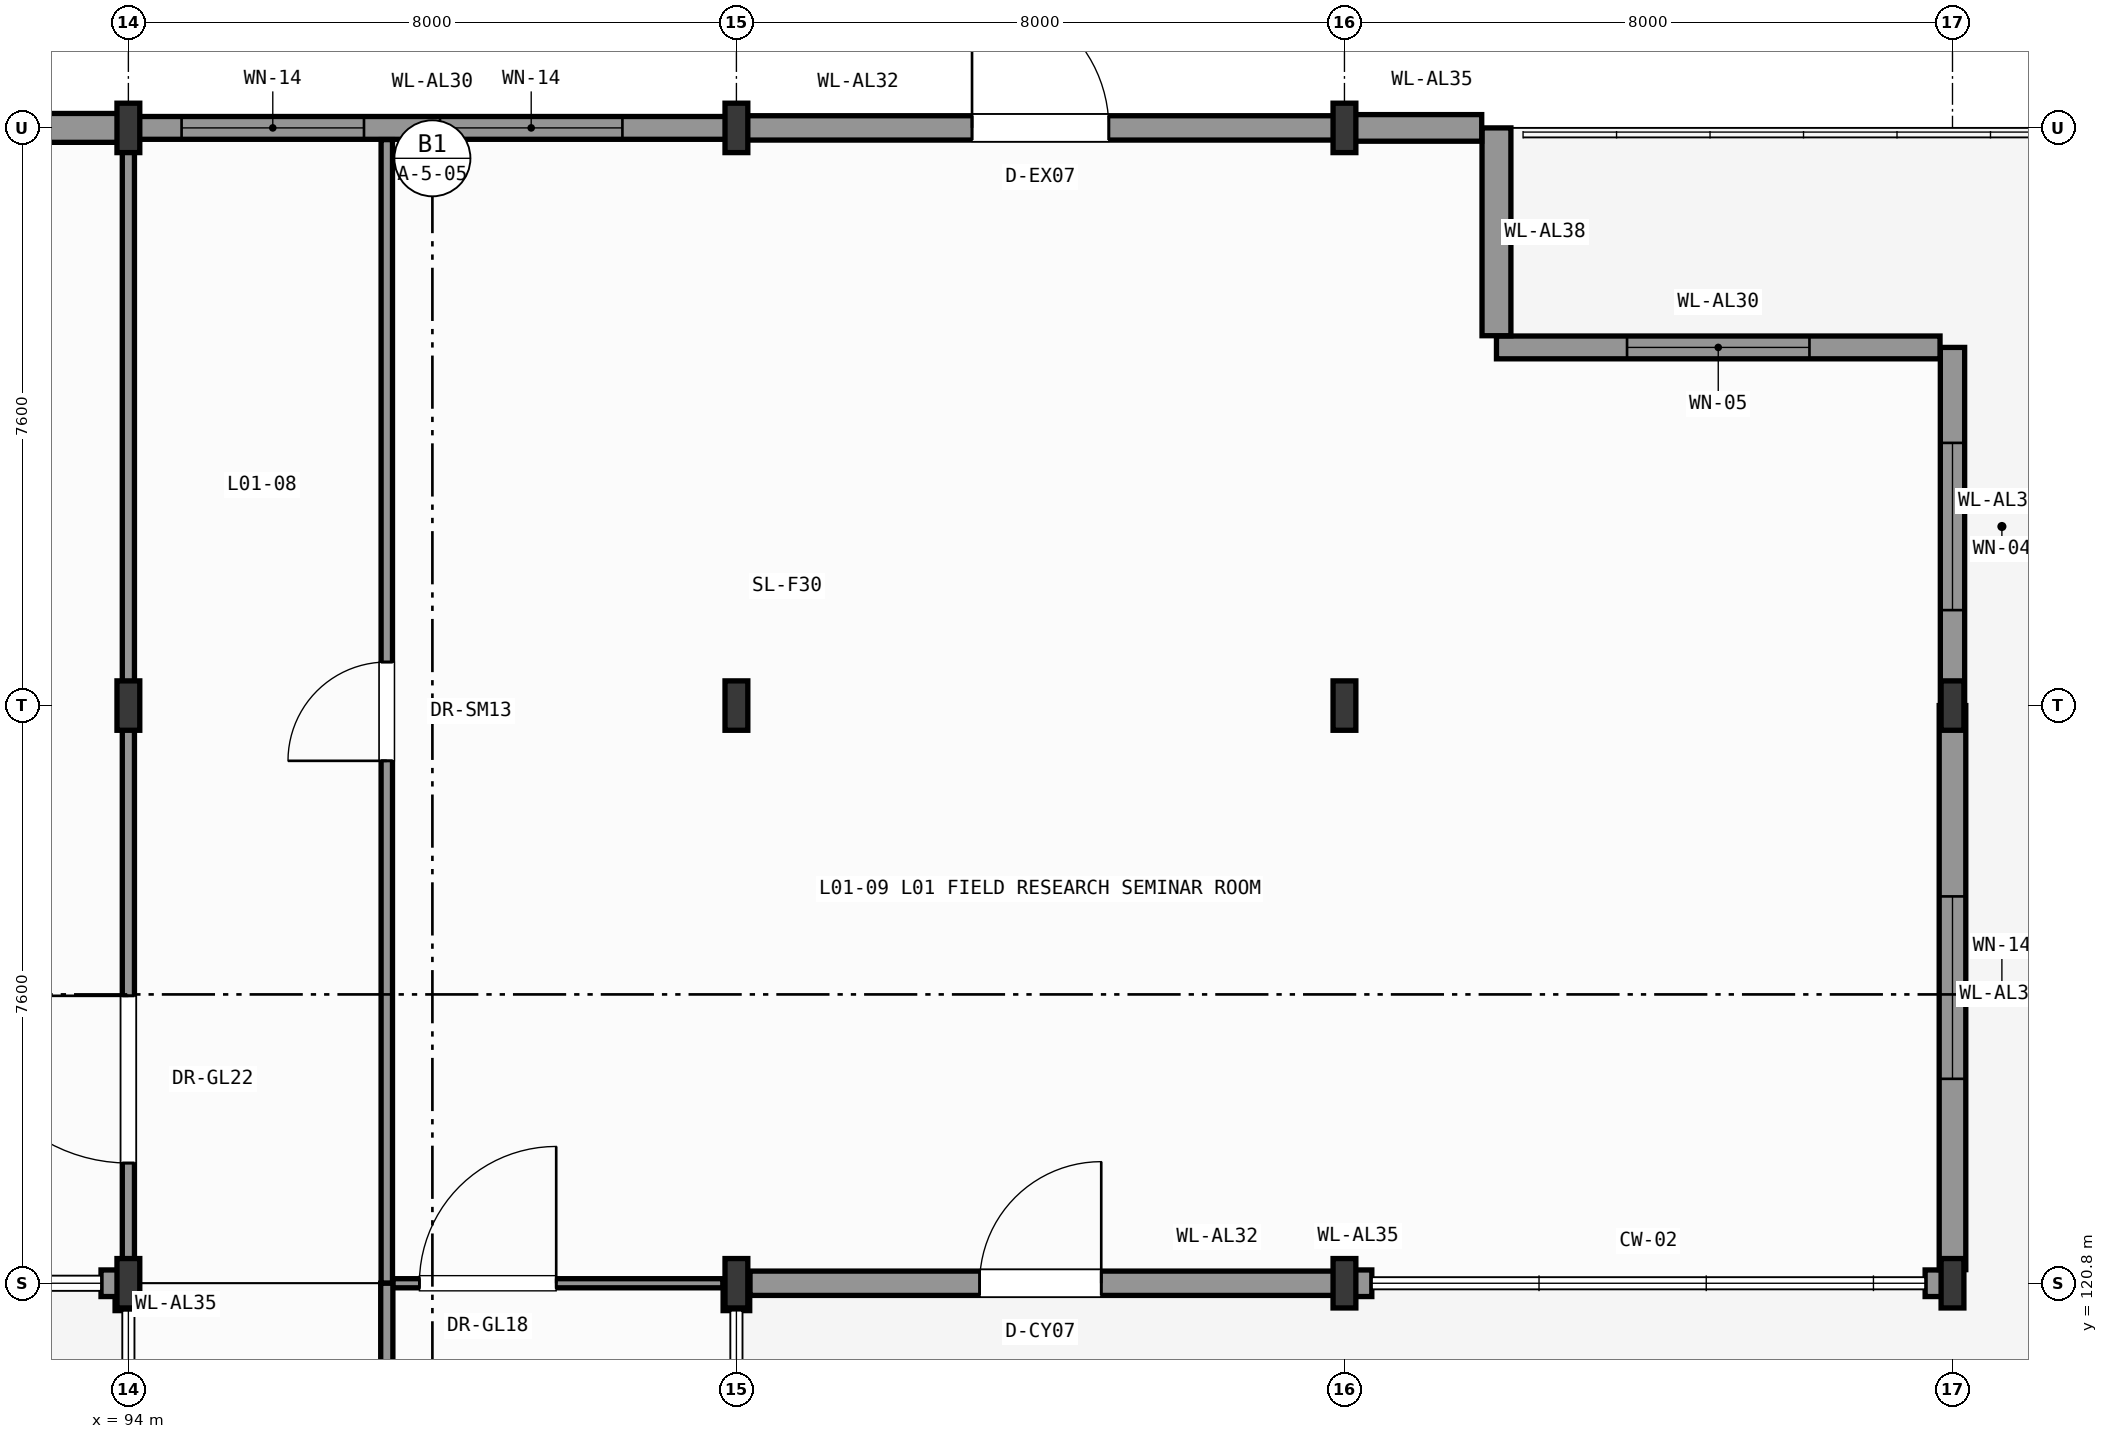
"""IFC4 building model, lengths in metres.
Left out: names, types, materials, properties, quantities, classifications, styles, units other than length and angle.
Written with IfcOpenShell. Run it as: python <this file> out.ifc"""

import sys

from ifc_helpers import new_model, si_unit, direction, frame, frame_2d, origin, origin_2d, place, context, subcontext, project, spatial, rectangle, i_section, extrude, element, fill, save


model = new_model("IFC4")
c1 = context("Model", 3, precision=1e-05, world=origin(), true_north=direction((0.0, 1.0)))
c2 = subcontext(c1, "Body", "Model", "MODEL_VIEW")
j1 = project(units=[si_unit("LENGTHUNIT", "METRE"), si_unit("PLANEANGLEUNIT", "RADIAN")], contexts=[c1])
p1 = place(None, origin())
s1 = spatial("IfcSite", under=j1, at=p1, CompositionType="ELEMENT")
p2 = place(p1, origin())
s2 = spatial("IfcBuilding", under=s1, at=p2, CompositionType="ELEMENT")
p3 = place(p2, origin())
s3 = spatial("IfcBuildingStorey", under=s2, at=p3, CompositionType="ELEMENT", Elevation=0.0)
for number, where, z_axis, x_axis in (
    (1, (94.0, 120.8, 0.0), (0.0, 0.0, 1.0), (1.0, 0.0, 0.0)),
    (2, (94.0, 128.4, 0.0), (0.0, 0.0, 1.0), (1.0, 0.0, 0.0)),
    (3, (94.0, 136.0, 0.0), (0.0, 0.0, 1.0), (1.0, 0.0, 0.0)),
    (4, (102.0, 120.8, 0.0), (0.0, 0.0, 1.0), (1.0, 0.0, 0.0)),
    (5, (102.0, 128.4, 0.0), (0.0, 0.0, 1.0), (1.0, 0.0, 0.0)),
    (6, (102.0, 136.0, 0.0), (0.0, 0.0, 1.0), (1.0, 0.0, 0.0)),
    (7, (110.0, 120.8, 0.0), (0.0, 0.0, 1.0), (1.0, 0.0, 0.0)),
    (8, (110.0, 128.4, 0.0), (0.0, 0.0, 1.0), (1.0, 0.0, 0.0)),
    (9, (110.0, 136.0, 0.0), (0.0, 0.0, 1.0), (1.0, 0.0, 0.0)),
    (10, (118.0, 120.8, 0.0), (0.0, 0.0, 1.0), (1.0, 0.0, 0.0)),
    (11, (118.0, 128.4, 0.0), (0.0, 0.0, 1.0), (1.0, 0.0, 0.0)),
):
    element("IfcColumn", number, at=place(p3, frame(where, z_axis=z_axis, x_axis=x_axis)), inside=s3, PredefinedType="COLUMN", context=c2, shape_type="SweptSolid", body=[
        extrude(i_section(OverallWidth=0.3, OverallDepth=0.65, WebThickness=0.016, FlangeThickness=0.031, FilletRadius=0.027, at=origin_2d()), origin(), (0.0, 0.0, 1.0), 7.8),
    ])
p4 = place(p3, frame((102.0, 120.44, 0.0), z_axis=(0.0, 0.0, 1.0), x_axis=(0.0, 1.0, 0.0)))
e12 = element("IfcWall", 12, at=p4, inside=s3, PredefinedType="SOLIDWALL", context=c2, shape_type="SweptSolid", body=[
    extrude(rectangle(XDim=0.36, YDim=0.35, at=frame_2d((0.18, 0.0))), origin(), (0.0, 0.0, 1.0), 7.025),
])
p5 = place(p3, frame((110.0, 120.8, 0.0), z_axis=(0.0, 0.0, 1.0), x_axis=(-1.0, 0.0, 0.0)))
e13 = element("IfcWall", 13, at=p5, inside=s3, PredefinedType="SOLIDWALL", context=c2, shape_type="SweptSolid", body=[
    extrude(rectangle(XDim=7.821, YDim=0.32, at=frame_2d((3.911, 0.0))), origin(), (0.0, 0.0, 1.0), 7.075),
])
p6 = place(p5, frame((3.2, 0.0, 0.0)))
e14 = element("IfcOpeningElement", 14, at=p6, cuts=e13, PredefinedType="OPENING", context=c2, shape_type="SweptSolid", body=[
    extrude(rectangle(XDim=1.6, YDim=2.4, at=frame_2d((0.8, 1.2))), frame((0.0, 0.17, 0.0), z_axis=(0.0, -1.0, 0.0), x_axis=(1.0, 0.0, 0.0)), (0.0, 0.0, 1.0), 0.34),
])
for number, where, z_axis, x_axis in (
    (15, (110.0, 120.8, 0.0), (0.0, 0.0, 1.0), (1.0, 0.0, 0.0)),
    (16, (117.64, 120.8, 0.0), (0.0, 0.0, 1.0), (1.0, 0.0, 0.0)),
):
    element("IfcWall", number, at=place(p3, frame(where, z_axis=z_axis, x_axis=x_axis)), inside=s3, PredefinedType="SOLIDWALL", context=c2, shape_type="SweptSolid", body=[
        extrude(rectangle(XDim=0.36, YDim=0.35, at=frame_2d((0.18, 0.0))), origin(), (0.0, 0.0, 1.0), 7.075),
    ])
p7 = place(p3, frame((118.0, 128.4, 0.0), z_axis=(0.0, 0.0, 1.0), x_axis=(0.0, -1.0, 0.0)))
e17 = element("IfcWall", 17, at=p7, inside=s3, PredefinedType="SOLIDWALL", context=c2, shape_type="SweptSolid", body=[
    extrude(rectangle(XDim=7.421, YDim=0.35, at=frame_2d((3.71, 0.0))), origin(), (0.0, 0.0, 1.0), 7.025),
])
p8 = place(p7, frame((2.51, 0.0, 0.95)))
e18 = element("IfcOpeningElement", 18, at=p8, cuts=e17, PredefinedType="OPENING", context=c2, shape_type="SweptSolid", body=[
    extrude(rectangle(XDim=2.4, YDim=3.0, at=frame_2d((1.2, 1.5))), frame((0.0, 0.185, 0.0), z_axis=(0.0, -1.0, 0.0), x_axis=(1.0, 0.0, 0.0)), (0.0, 0.0, 1.0), 0.37),
])
p9 = place(p3, frame((118.0, 133.112, 0.0), z_axis=(0.0, 0.0, 1.0), x_axis=(0.0, -1.0, 0.0)))
e19 = element("IfcWall", 19, at=p9, inside=s3, PredefinedType="SOLIDWALL", context=c2, shape_type="SweptSolid", body=[
    extrude(rectangle(XDim=4.712, YDim=0.32, at=frame_2d((2.356, 0.0))), origin(), (0.0, 0.0, 1.0), 7.54),
])
p10 = place(p9, frame((1.256, 0.0, 0.95)))
e20 = element("IfcOpeningElement", 20, at=p10, cuts=e19, PredefinedType="OPENING", context=c2, shape_type="SweptSolid", body=[
    extrude(rectangle(XDim=2.2, YDim=4.2, at=frame_2d((1.1, 2.1))), frame((0.0, 0.17, 0.0), z_axis=(0.0, -1.0, 0.0), x_axis=(1.0, 0.0, 0.0)), (0.0, 0.0, 1.0), 0.34),
])
p11 = place(p3, frame((112.0, 133.112, 0.0), z_axis=(0.0, 0.0, 1.0), x_axis=(1.0, 0.0, 0.0)))
e21 = element("IfcWall", 21, at=p11, inside=s3, PredefinedType="SOLIDWALL", context=c2, shape_type="SweptSolid", body=[
    extrude(rectangle(XDim=5.836, YDim=0.3, at=frame_2d((2.918, 0.0))), origin(), (0.0, 0.0, 1.0), 7.54),
])
p12 = place(p11, frame((1.718, 0.0, 0.95)))
e22 = element("IfcOpeningElement", 22, at=p12, cuts=e21, PredefinedType="OPENING", context=c2, shape_type="SweptSolid", body=[
    extrude(rectangle(XDim=2.4, YDim=4.6, at=frame_2d((1.2, 2.3))), frame((0.0, 0.16, 0.0), z_axis=(0.0, -1.0, 0.0), x_axis=(1.0, 0.0, 0.0)), (0.0, 0.0, 1.0), 0.32),
])
p13 = place(p3, frame((112.0, 136.0, 0.0), z_axis=(0.0, 0.0, 1.0), x_axis=(0.0, -1.0, 0.0)))
e23 = element("IfcWall", 23, at=p13, inside=s3, PredefinedType="SOLIDWALL", context=c2, shape_type="SweptSolid", body=[
    extrude(rectangle(XDim=2.734, YDim=0.38, at=frame_2d((1.367, 0.0))), origin(), (0.0, 0.0, 1.0), 7.54),
])
p14 = place(p3, frame((110.0, 136.0, 0.0), z_axis=(0.0, 0.0, 1.0), x_axis=(1.0, 0.0, 0.0)))
e24 = element("IfcWall", 24, at=p14, inside=s3, PredefinedType="SOLIDWALL", context=c2, shape_type="SweptSolid", body=[
    extrude(rectangle(XDim=1.806, YDim=0.35, at=frame_2d((0.903, 0.0))), origin(), (0.0, 0.0, 1.0), 7.54),
])
p15 = place(p3, frame((102.0, 136.0, 0.0), z_axis=(0.0, 0.0, 1.0), x_axis=(1.0, 0.0, 0.0)))
e25 = element("IfcWall", 25, at=p15, inside=s3, PredefinedType="SOLIDWALL", context=c2, shape_type="SweptSolid", body=[
    extrude(rectangle(XDim=8.0, YDim=0.32, at=frame_2d((4.0, 0.0))), origin(), (0.0, 0.0, 1.0), 7.135),
])
p16 = place(p15, frame((3.1, 0.0, 0.0)))
e26 = element("IfcOpeningElement", 26, at=p16, cuts=e25, PredefinedType="OPENING", context=c2, shape_type="SweptSolid", body=[
    extrude(rectangle(XDim=1.8, YDim=2.4, at=frame_2d((0.9, 1.2))), frame((0.0, 0.17, 0.0), z_axis=(0.0, -1.0, 0.0), x_axis=(1.0, 0.0, 0.0)), (0.0, 0.0, 1.0), 0.34),
])
p17 = place(p3, frame((94.0, 136.0, 0.0), z_axis=(0.0, 0.0, 1.0), x_axis=(1.0, 0.0, 0.0)))
e27 = element("IfcWall", 27, at=p17, inside=s3, PredefinedType="SOLIDWALL", context=c2, shape_type="SweptSolid", body=[
    extrude(rectangle(XDim=8.0, YDim=0.3, at=frame_2d((4.0, 0.0))), origin(), (0.0, 0.0, 1.0), 7.135),
])
p18 = place(p17, frame((0.7, 0.0, 0.95)))
e28 = element("IfcOpeningElement", 28, at=p18, cuts=e27, PredefinedType="OPENING", context=c2, shape_type="SweptSolid", body=[
    extrude(rectangle(XDim=2.4, YDim=3.0, at=frame_2d((1.2, 1.5))), frame((0.0, 0.16, 0.0), z_axis=(0.0, -1.0, 0.0), x_axis=(1.0, 0.0, 0.0)), (0.0, 0.0, 1.0), 0.32),
])
p19 = place(p17, frame((4.1, 0.0, 0.95)))
e29 = element("IfcOpeningElement", 29, at=p19, cuts=e27, PredefinedType="OPENING", context=c2, shape_type="SweptSolid", body=[
    extrude(rectangle(XDim=2.4, YDim=3.0, at=frame_2d((1.2, 1.5))), frame((0.0, 0.16, 0.0), z_axis=(0.0, -1.0, 0.0), x_axis=(1.0, 0.0, 0.0)), (0.0, 0.0, 1.0), 0.32),
])
p20 = place(p3, frame((86.0, 136.0, 0.0), z_axis=(0.0, 0.0, 1.0), x_axis=(1.0, 0.0, 0.0)))
e30 = element("IfcWall", 30, at=p20, inside=s3, PredefinedType="SOLIDWALL", context=c2, shape_type="SweptSolid", body=[
    extrude(rectangle(XDim=8.0, YDim=0.38, at=frame_2d((4.0, 0.0))), origin(), (0.0, 0.0, 1.0), 7.135),
])
p21 = place(p20, frame((1.467, 0.0, 0.95)))
e31 = element("IfcOpeningElement", 31, at=p21, cuts=e30, PredefinedType="OPENING", context=c2, shape_type="SweptSolid", body=[
    extrude(rectangle(XDim=2.4, YDim=4.6, at=frame_2d((1.2, 2.3))), frame((0.0, 0.2, 0.0), z_axis=(0.0, -1.0, 0.0), x_axis=(1.0, 0.0, 0.0)), (0.0, 0.0, 1.0), 0.4),
])
p22 = place(p20, frame((4.133, 0.0, 0.95)))
e32 = element("IfcOpeningElement", 32, at=p22, cuts=e30, PredefinedType="OPENING", context=c2, shape_type="SweptSolid", body=[
    extrude(rectangle(XDim=2.4, YDim=4.6, at=frame_2d((1.2, 2.3))), frame((0.0, 0.2, 0.0), z_axis=(0.0, -1.0, 0.0), x_axis=(1.0, 0.0, 0.0)), (0.0, 0.0, 1.0), 0.4),
])
p23 = place(p3, frame((93.64, 120.8, 0.0), z_axis=(0.0, 0.0, 1.0), x_axis=(1.0, 0.0, 0.0)))
e33 = element("IfcWall", 33, at=p23, inside=s3, PredefinedType="SOLIDWALL", context=c2, shape_type="SweptSolid", body=[
    extrude(rectangle(XDim=0.36, YDim=0.35, at=frame_2d((0.18, 0.0))), origin(), (0.0, 0.0, 1.0), 7.225),
])
p24 = place(p3, frame((94.0, 120.621, 0.0), z_axis=(0.0, 0.0, 1.0), x_axis=(0.0, -1.0, 0.0)))
e34 = element("IfcWall", 34, at=p24, inside=s3, PredefinedType="SOLIDWALL", context=c2, shape_type="SweptSolid", body=[
    extrude(rectangle(XDim=0.181, YDim=0.35, at=frame_2d((0.091, 0.0))), origin(), (0.0, 0.0, 1.0), 7.54),
])
p25 = place(p3, frame((94.0, 120.979, 0.0), z_axis=(0.0, 0.0, 1.0), x_axis=(0.0, 1.0, 0.0)))
e35 = element("IfcWall", 35, at=p25, inside=s3, PredefinedType="PARTITIONING", context=c2, shape_type="SweptSolid", body=[
    extrude(rectangle(XDim=14.827, YDim=0.16, at=frame_2d((7.414, 0.0))), origin(), (0.0, 0.0, 1.0), 7.025),
])
p26 = place(p25, frame((1.402, 0.0, 0.0)))
e36 = element("IfcOpeningElement", 36, at=p26, cuts=e35, PredefinedType="OPENING", context=c2, shape_type="SweptSolid", body=[
    extrude(rectangle(XDim=2.2, YDim=2.6, at=frame_2d((1.1, 1.3))), frame((0.0, 0.09, 0.0), z_axis=(0.0, -1.0, 0.0), x_axis=(1.0, 0.0, 0.0)), (0.0, 0.0, 1.0), 0.18),
])
p27 = place(p3, frame((97.4, 120.8, 0.0), z_axis=(0.0, 0.0, 1.0), x_axis=(0.0, 1.0, 0.0)))
e37 = element("IfcWall", 37, at=p27, inside=s3, PredefinedType="PARTITIONING", context=c2, shape_type="SweptSolid", body=[
    extrude(rectangle(XDim=15.046, YDim=0.15, at=frame_2d((7.523, 0.0))), origin(), (0.0, 0.0, 1.0), 7.54),
])
p28 = place(p27, frame((6.873, 0.0, 0.0)))
e38 = element("IfcOpeningElement", 38, at=p28, cuts=e37, PredefinedType="OPENING", context=c2, shape_type="SweptSolid", body=[
    extrude(rectangle(XDim=1.3, YDim=2.25, at=frame_2d((0.65, 1.125))), frame((0.0, 0.085, 0.0), z_axis=(0.0, -1.0, 0.0), x_axis=(1.0, 0.0, 0.0)), (0.0, 0.0, 1.0), 0.17),
])
p29 = place(p3, frame((97.479, 120.8, 0.0), z_axis=(0.0, 0.0, 1.0), x_axis=(1.0, 0.0, 0.0)))
e39 = element("IfcWall", 39, at=p29, inside=s3, PredefinedType="PARTITIONING", context=c2, shape_type="SweptSolid", body=[
    extrude(rectangle(XDim=4.342, YDim=0.12, at=frame_2d((2.171, 0.0))), origin(), (0.0, 0.0, 1.0), 7.165),
])
p30 = place(p29, frame((0.35, 0.0, 0.0)))
e40 = element("IfcOpeningElement", 40, at=p30, cuts=e39, PredefinedType="OPENING", context=c2, shape_type="SweptSolid", body=[
    extrude(rectangle(XDim=1.8, YDim=2.4, at=frame_2d((0.9, 1.2))), frame((0.0, 0.07, 0.0), z_axis=(0.0, -1.0, 0.0), x_axis=(1.0, 0.0, 0.0)), (0.0, 0.0, 1.0), 0.14),
])
p31 = place(p3, frame((97.4, 90.4, 0.0), z_axis=(0.0, 0.0, 1.0), x_axis=(0.0, 1.0, 0.0)))
e41 = element("IfcWall", 41, at=p31, inside=s3, PredefinedType="PARTITIONING", context=c2, shape_type="SweptSolid", body=[
    extrude(rectangle(XDim=30.4, YDim=0.16, at=frame_2d((15.2, 0.0))), origin(), (0.0, 0.0, 1.0), 7.54),
])
p32 = place(p31, frame((14.1, 0.0, 0.0)))
e42 = element("IfcOpeningElement", 42, at=p32, cuts=e41, PredefinedType="OPENING", context=c2, shape_type="SweptSolid", body=[
    extrude(rectangle(XDim=2.2, YDim=2.6, at=frame_2d((1.1, 1.3))), frame((0.0, 0.09, 0.0), z_axis=(0.0, -1.0, 0.0), x_axis=(1.0, 0.0, 0.0)), (0.0, 0.0, 1.0), 0.18),
])
p33 = place(p6, origin())
e43 = element("IfcDoor", 43, at=p33, inside=s3, OperationType="SINGLE_SWING_LEFT", PredefinedType="DOOR", context=c2, shape_type="SweptSolid", body=[
    extrude(rectangle(XDim=1.6, YDim=2.4, at=frame_2d((0.8, 1.2))), frame((0.0, 0.025, 0.0), z_axis=(0.0, -1.0, 0.0), x_axis=(1.0, 0.0, 0.0)), (0.0, 0.0, 1.0), 0.05),
])
fill(e14, e43)
p34 = place(p8, origin())
e44 = element("IfcWindow", 44, at=p34, inside=s3, PartitioningType="SINGLE_PANEL", PredefinedType="WINDOW", context=c2, shape_type="SweptSolid", body=[
    extrude(rectangle(XDim=2.4, YDim=3.0, at=frame_2d((1.2, 1.5))), frame((0.0, 0.03, 0.0), z_axis=(0.0, -1.0, 0.0), x_axis=(1.0, 0.0, 0.0)), (0.0, 0.0, 1.0), 0.06),
])
fill(e18, e44)
p35 = place(p10, origin())
e45 = element("IfcWindow", 45, at=p35, inside=s3, PartitioningType="SINGLE_PANEL", PredefinedType="WINDOW", context=c2, shape_type="SweptSolid", body=[
    extrude(rectangle(XDim=2.2, YDim=4.2, at=frame_2d((1.1, 2.1))), frame((0.0, 0.03, 0.0), z_axis=(0.0, -1.0, 0.0), x_axis=(1.0, 0.0, 0.0)), (0.0, 0.0, 1.0), 0.06),
])
fill(e20, e45)
p36 = place(p12, origin())
e46 = element("IfcWindow", 46, at=p36, inside=s3, PartitioningType="SINGLE_PANEL", PredefinedType="WINDOW", context=c2, shape_type="SweptSolid", body=[
    extrude(rectangle(XDim=2.4, YDim=4.6, at=frame_2d((1.2, 2.3))), frame((0.0, 0.03, 0.0), z_axis=(0.0, -1.0, 0.0), x_axis=(1.0, 0.0, 0.0)), (0.0, 0.0, 1.0), 0.06),
])
fill(e22, e46)
p37 = place(p16, origin())
e47 = element("IfcDoor", 47, at=p37, inside=s3, OperationType="SINGLE_SWING_LEFT", PredefinedType="DOOR", context=c2, shape_type="SweptSolid", body=[
    extrude(rectangle(XDim=1.8, YDim=2.4, at=frame_2d((0.9, 1.2))), frame((0.0, 0.025, 0.0), z_axis=(0.0, -1.0, 0.0), x_axis=(1.0, 0.0, 0.0)), (0.0, 0.0, 1.0), 0.05),
])
fill(e26, e47)
p38 = place(p18, origin())
e48 = element("IfcWindow", 48, at=p38, inside=s3, PartitioningType="SINGLE_PANEL", PredefinedType="WINDOW", context=c2, shape_type="SweptSolid", body=[
    extrude(rectangle(XDim=2.4, YDim=3.0, at=frame_2d((1.2, 1.5))), frame((0.0, 0.03, 0.0), z_axis=(0.0, -1.0, 0.0), x_axis=(1.0, 0.0, 0.0)), (0.0, 0.0, 1.0), 0.06),
])
fill(e28, e48)
p39 = place(p19, origin())
e49 = element("IfcWindow", 49, at=p39, inside=s3, PartitioningType="SINGLE_PANEL", PredefinedType="WINDOW", context=c2, shape_type="SweptSolid", body=[
    extrude(rectangle(XDim=2.4, YDim=3.0, at=frame_2d((1.2, 1.5))), frame((0.0, 0.03, 0.0), z_axis=(0.0, -1.0, 0.0), x_axis=(1.0, 0.0, 0.0)), (0.0, 0.0, 1.0), 0.06),
])
fill(e29, e49)
p40 = place(p26, origin())
e50 = element("IfcDoor", 50, at=p40, inside=s3, OperationType="SINGLE_SWING_RIGHT", PredefinedType="DOOR", context=c2, shape_type="SweptSolid", body=[
    extrude(rectangle(XDim=2.2, YDim=2.6, at=frame_2d((1.1, 1.3))), frame((0.0, 0.025, 0.0), z_axis=(0.0, -1.0, 0.0), x_axis=(1.0, 0.0, 0.0)), (0.0, 0.0, 1.0), 0.05),
])
fill(e36, e50)
p41 = place(p28, origin())
e51 = element("IfcDoor", 51, at=p41, inside=s3, OperationType="SINGLE_SWING_LEFT", PredefinedType="DOOR", context=c2, shape_type="SweptSolid", body=[
    extrude(rectangle(XDim=1.3, YDim=2.25, at=frame_2d((0.65, 1.125))), frame((0.0, 0.025, 0.0), z_axis=(0.0, -1.0, 0.0), x_axis=(1.0, 0.0, 0.0)), (0.0, 0.0, 1.0), 0.05),
])
fill(e38, e51)
p42 = place(p30, origin())
e52 = element("IfcDoor", 52, at=p42, inside=s3, OperationType="SINGLE_SWING_RIGHT", PredefinedType="DOOR", context=c2, shape_type="SweptSolid", body=[
    extrude(rectangle(XDim=1.8, YDim=2.4, at=frame_2d((0.9, 1.2))), frame((0.0, 0.025, 0.0), z_axis=(0.0, -1.0, 0.0), x_axis=(1.0, 0.0, 0.0)), (0.0, 0.0, 1.0), 0.05),
])
fill(e40, e52)
save(model, sys.argv[1])
